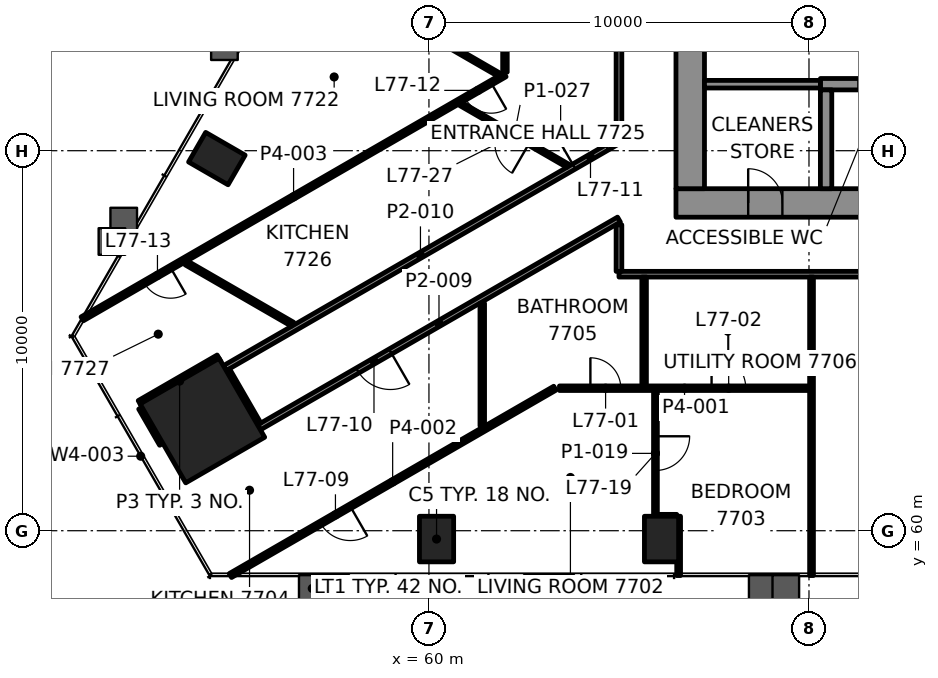
"""IFC4 building model, lengths in metres.
Left out: names, types, materials, properties, quantities, classifications, styles, units other than length and angle.
Written with IfcOpenShell. Run it as: python <this file> out.ifc"""

import sys

from ifc_helpers import new_model, si_unit, direction, frame, frame_2d, origin, origin_2d, place, context, subcontext, project, spatial, rectangle, hollow_rectangle, extrude, element, fill, save


model = new_model("IFC4")
c1 = context("Model", 3, precision=1e-05, world=origin(), true_north=direction((0.0, 1.0)))
c2 = subcontext(c1, "Body", "Model", "MODEL_VIEW")
j1 = project(units=[si_unit("LENGTHUNIT", "METRE"), si_unit("PLANEANGLEUNIT", "RADIAN")], contexts=[c1])
p1 = place(None, origin())
s1 = spatial("IfcSite", under=j1, at=p1, CompositionType="ELEMENT")
p2 = place(p1, origin())
s2 = spatial("IfcBuilding", under=s1, at=p2, CompositionType="ELEMENT")
p3 = place(p2, frame((0.0, 0.0, 316.1)))
s3 = spatial("IfcBuildingStorey", under=s2, at=p3, CompositionType="ELEMENT", Elevation=316.1)
p4 = place(p3, frame((54.039, 62.898, 0.0), z_axis=(0.0, 0.0, 1.0), x_axis=(0.5, -0.866025403784, 0.0)))
e1 = element("IfcColumn", 1, at=p4, inside=s3, PredefinedType="COLUMN", context=c2, shape_type="SweptSolid", body=[
    extrude(rectangle(XDim=2.4, YDim=2.4, at=origin_2d()), origin(), (0.0, 0.0, 1.0), 3.5),
])
for number, where, z_axis, x_axis in (
    (2, (60.2, 59.78, -0.0), (0.0, 0.0, 1.0), (1.0, 0.0, 0.0)),
    (3, (66.12, 59.78, -0.0), (0.0, 0.0, 1.0), (1.0, 0.0, 0.0)),
    (4, (54.419, 69.793, -0.0), (0.0, 0.0, 1.0), (-0.5, -0.866, 0.0)),
):
    element("IfcColumn", number, at=place(p3, frame(where, z_axis=z_axis, x_axis=x_axis)), inside=s3, PredefinedType="COLUMN", context=c2, shape_type="SweptSolid", body=[
        extrude(hollow_rectangle(XDim=0.9, YDim=1.2, WallThickness=0.06, at=origin_2d()), origin(), (0.0, 0.0, 1.0), 3.5),
    ])
p5 = place(p3, frame((66.5, 68.625, 0.0), z_axis=(0.0, 0.0, 1.0), x_axis=(1.0, 0.0, 0.0)))
e5 = element("IfcWall", 5, at=p5, inside=s3, PredefinedType="SHEAR", context=c2, shape_type="SweptSolid", body=[
    extrude(rectangle(XDim=17.0, YDim=0.75, at=frame_2d((8.5, 0.0))), origin(), (0.0, 0.0, 1.0), 3.3),
])
p6 = place(p5, frame((1.9, 0.0, 0.0)))
e6 = element("IfcOpeningElement", 6, at=p6, cuts=e5, PredefinedType="OPENING", context=c2, shape_type="SweptSolid", body=[
    extrude(rectangle(XDim=0.9, YDim=2.1, at=frame_2d((0.45, 1.05))), frame((0.0, 0.385, 0.0), z_axis=(0.0, -1.0, 0.0), x_axis=(1.0, 0.0, 0.0)), (0.0, 0.0, 1.0), 0.77),
])
p7 = place(p3, frame((66.875, 69.0, 0.0), z_axis=(0.0, 0.0, 1.0), x_axis=(0.0, 1.0, 0.0)))
e7 = element("IfcWall", 7, at=p7, inside=s3, PredefinedType="SHEAR", context=c2, shape_type="SweptSolid", body=[
    extrude(rectangle(XDim=12.0, YDim=0.75, at=frame_2d((6.0, 0.0))), origin(), (0.0, 0.0, 1.0), 3.3),
])
p8 = place(p7, frame((3.7, 0.0, 0.0)))
e8 = element("IfcOpeningElement", 8, at=p8, cuts=e7, PredefinedType="OPENING", context=c2, shape_type="SweptSolid", body=[
    extrude(rectangle(XDim=1.2, YDim=2.1, at=frame_2d((0.6, 1.05))), frame((0.0, 0.385, 0.0), z_axis=(0.0, -1.0, 0.0), x_axis=(1.0, 0.0, 0.0)), (0.0, 0.0, 1.0), 0.77),
])
p9 = place(p3, frame((70.3, 71.75, 0.0), z_axis=(0.0, 0.0, 1.0), x_axis=(1.0, 0.0, 0.0)))
e9 = element("IfcWall", 9, at=p9, inside=s3, PredefinedType="SHEAR", context=c2, shape_type="SweptSolid", body=[
    extrude(rectangle(XDim=11.5, YDim=0.3, at=frame_2d((5.75, 0.0))), origin(), (0.0, 0.0, 1.0), 3.3),
])
p10 = place(p9, frame((1.0, 0.0, 0.0)))
e10 = element("IfcOpeningElement", 10, at=p10, cuts=e9, PredefinedType="OPENING", context=c2, shape_type="SweptSolid", body=[
    extrude(rectangle(XDim=1.1, YDim=2.1, at=frame_2d((0.55, 1.05))), frame((0.0, 0.16, 0.0), z_axis=(0.0, -1.0, 0.0), x_axis=(1.0, 0.0, 0.0)), (0.0, 0.0, 1.0), 0.32),
])
p11 = place(p9, frame((3.8, 0.0, 0.0)))
e11 = element("IfcOpeningElement", 11, at=p11, cuts=e9, PredefinedType="OPENING", context=c2, shape_type="SweptSolid", body=[
    extrude(rectangle(XDim=1.1, YDim=2.1, at=frame_2d((0.55, 1.05))), frame((0.0, 0.16, 0.0), z_axis=(0.0, -1.0, 0.0), x_axis=(1.0, 0.0, 0.0)), (0.0, 0.0, 1.0), 0.32),
])
p12 = place(p9, frame((6.6, 0.0, 0.0)))
e12 = element("IfcOpeningElement", 12, at=p12, cuts=e9, PredefinedType="OPENING", context=c2, shape_type="SweptSolid", body=[
    extrude(rectangle(XDim=1.1, YDim=2.1, at=frame_2d((0.55, 1.05))), frame((0.0, 0.16, 0.0), z_axis=(0.0, -1.0, 0.0), x_axis=(1.0, 0.0, 0.0)), (0.0, 0.0, 1.0), 0.32),
])
p13 = place(p9, frame((9.4, 0.0, 0.0)))
e13 = element("IfcOpeningElement", 13, at=p13, cuts=e9, PredefinedType="OPENING", context=c2, shape_type="SweptSolid", body=[
    extrude(rectangle(XDim=1.1, YDim=2.1, at=frame_2d((0.55, 1.05))), frame((0.0, 0.16, 0.0), z_axis=(0.0, -1.0, 0.0), x_axis=(1.0, 0.0, 0.0)), (0.0, 0.0, 1.0), 0.32),
])
p14 = place(p3, frame((70.45, 69.0, 0.0), z_axis=(0.0, 0.0, 1.0), x_axis=(0.0, 1.0, 0.0)))
e14 = element("IfcWall", 14, at=p14, inside=s3, PredefinedType="SHEAR", context=c2, shape_type="SweptSolid", body=[
    extrude(rectangle(XDim=2.6, YDim=0.3, at=frame_2d((1.3, 0.0))), origin(), (0.0, 0.0, 1.0), 3.3),
])
p15 = place(p3, frame((66.02, 60.38, 0.0), z_axis=(0.0, 0.0, 1.0), x_axis=(1.0, 0.0, 0.0)))
e15 = element("IfcWall", 15, at=p15, inside=s3, PredefinedType="PARTITIONING", context=c2, shape_type="SweptSolid", body=[
    extrude(rectangle(XDim=0.5, YDim=0.1, at=frame_2d((0.25, 0.0))), origin(), (0.0, 0.0, 1.0), 2.7),
])
p16 = place(p3, frame((63.434, 63.75, 0.0), z_axis=(0.0, 0.0, 1.0), x_axis=(1.0, 0.0, 0.0)))
e16 = element("IfcWall", 16, at=p16, inside=s3, PredefinedType="PARTITIONING", context=c2, shape_type="SweptSolid", body=[
    extrude(rectangle(XDim=6.582, YDim=0.12, at=frame_2d((3.291, 0.0))), origin(), (0.0, 0.0, 1.0), 2.7),
])
p17 = place(p16, frame((0.814, 0.0, 0.0)))
e17 = element("IfcOpeningElement", 17, at=p17, cuts=e16, PredefinedType="OPENING", context=c2, shape_type="SweptSolid", body=[
    extrude(rectangle(XDim=0.8, YDim=2.1, at=frame_2d((0.4, 1.05))), frame((0.0, 0.07, 0.0), z_axis=(0.0, -1.0, 0.0), x_axis=(1.0, 0.0, 0.0)), (0.0, 0.0, 1.0), 0.14),
])
p18 = place(p16, frame((4.002, 0.0, 0.0)))
e18 = element("IfcOpeningElement", 18, at=p18, cuts=e16, PredefinedType="OPENING", context=c2, shape_type="SweptSolid", body=[
    extrude(rectangle(XDim=0.9, YDim=2.1, at=frame_2d((0.45, 1.05))), frame((0.0, 0.07, 0.0), z_axis=(0.0, -1.0, 0.0), x_axis=(1.0, 0.0, 0.0)), (0.0, 0.0, 1.0), 0.14),
])
p19 = place(p3, frame((85.0, 66.75, 0.0), z_axis=(0.0, 0.0, 1.0), x_axis=(-1.0, 0.0, 0.0)))
e19 = element("IfcWall", 19, at=p19, inside=s3, PredefinedType="PARTITIONING", context=c2, shape_type="SweptSolid", body=[
    extrude(rectangle(XDim=20.0, YDim=0.15, at=frame_2d((10.0, 0.0))), origin(), (0.0, 0.0, 1.0), 2.7),
])
p20 = place(p19, frame((2.135, 0.0, 0.0)))
e20 = element("IfcOpeningElement", 20, at=p20, cuts=e19, PredefinedType="OPENING", context=c2, shape_type="SweptSolid", body=[
    extrude(rectangle(XDim=1.0, YDim=2.1, at=frame_2d((0.5, 1.05))), frame((0.0, 0.085, 0.0), z_axis=(0.0, -1.0, 0.0), x_axis=(1.0, 0.0, 0.0)), (0.0, 0.0, 1.0), 0.17),
])
p21 = place(p19, frame((9.55, 0.0, 0.0)))
e21 = element("IfcOpeningElement", 21, at=p21, cuts=e19, PredefinedType="OPENING", context=c2, shape_type="SweptSolid", body=[
    extrude(rectangle(XDim=0.9, YDim=2.1, at=frame_2d((0.45, 1.05))), frame((0.0, 0.085, 0.0), z_axis=(0.0, -1.0, 0.0), x_axis=(1.0, 0.0, 0.0)), (0.0, 0.0, 1.0), 0.17),
])
p22 = place(p3, frame((63.314, 63.75, 0.0), z_axis=(0.0, 0.0, 1.0), x_axis=(-0.866028066272, -0.499995388408, 0.0)))
e22 = element("IfcWall", 22, at=p22, inside=s3, PredefinedType="PARTITIONING", context=c2, shape_type="SweptSolid", body=[
    extrude(rectangle(XDim=9.859, YDim=0.12, at=frame_2d((4.93, 0.0))), origin(), (0.0, 0.0, 1.0), 2.7),
])
p23 = place(p22, frame((6.218, 0.0, 0.0)))
e23 = element("IfcOpeningElement", 23, at=p23, cuts=e22, PredefinedType="OPENING", context=c2, shape_type="SweptSolid", body=[
    extrude(rectangle(XDim=0.9, YDim=2.1, at=frame_2d((0.45, 1.05))), frame((0.0, 0.07, 0.0), z_axis=(0.0, -1.0, 0.0), x_axis=(1.0, 0.0, 0.0)), (0.0, 0.0, 1.0), 0.14),
])
p24 = place(p3, frame((65.0, 68.187, 0.0), z_axis=(0.0, 0.0, 1.0), x_axis=(-0.866028339337, -0.499994915439, 0.0)))
e24 = element("IfcWall", 24, at=p24, inside=s3, PredefinedType="PARTITIONING", context=c2, shape_type="SweptSolid", body=[
    extrude(rectangle(XDim=10.937, YDim=0.15, at=frame_2d((5.468, 0.0))), origin(), (0.0, 0.0, 1.0), 2.697),
])
p25 = place(p24, frame((6.943, 0.0, 0.0)))
e25 = element("IfcOpeningElement", 25, at=p25, cuts=e24, PredefinedType="OPENING", context=c2, shape_type="SweptSolid", body=[
    extrude(rectangle(XDim=1.0, YDim=2.1, at=frame_2d((0.5, 1.05))), frame((0.0, 0.085, 0.0), z_axis=(0.0, -1.0, 0.0), x_axis=(1.0, 0.0, 0.0)), (0.0, 0.0, 1.0), 0.17),
])
p26 = place(p3, frame((54.628, 64.278, 0.0), z_axis=(0.0, 0.0, 1.0), x_axis=(0.866033426221, 0.499986104476, 0.0)))
e26 = element("IfcWall", 26, at=p26, inside=s3, PredefinedType="PARTITIONING", context=c2, shape_type="SweptSolid", body=[
    extrude(rectangle(XDim=11.89, YDim=0.15, at=frame_2d((5.945, 0.0))), origin(), (0.0, 0.0, 1.0), 2.7),
])
p27 = place(p26, frame((10.612, 0.0, 0.0)))
e27 = element("IfcOpeningElement", 27, at=p27, cuts=e26, PredefinedType="OPENING", context=c2, shape_type="SweptSolid", body=[
    extrude(rectangle(XDim=1.0, YDim=2.1, at=frame_2d((0.5, 1.05))), frame((0.0, 0.085, 0.0), z_axis=(0.0, -1.0, 0.0), x_axis=(1.0, 0.0, 0.0)), (0.0, 0.0, 1.0), 0.17),
])
p28 = place(p3, frame((52.4, 63.337, 0.0), z_axis=(0.0, 0.0, 1.0), x_axis=(0.866024647952, 0.500001309137, 0.0)))
e28 = element("IfcWall", 28, at=p28, inside=s3, PredefinedType="PARTITIONING", context=c2, shape_type="SweptSolid", body=[
    extrude(rectangle(XDim=2.4, YDim=0.2, at=frame_2d((1.2, 0.0))), origin(), (0.0, 0.0, 1.0), 2.7),
])
p29 = place(p3, frame((62.0, 71.998, 0.0), z_axis=(0.0, 0.0, 1.0), x_axis=(-0.866023842607, -0.500002704028, 0.0)))
e29 = element("IfcWall", 29, at=p29, inside=s3, PredefinedType="PARTITIONING", context=c2, shape_type="SweptSolid", body=[
    extrude(rectangle(XDim=12.845, YDim=0.12, at=frame_2d((6.422, 0.0))), origin(), (0.0, 0.0, 1.0), 2.7),
])
p30 = place(p29, frame((0.421, 0.0, 0.0)))
e30 = element("IfcOpeningElement", 30, at=p30, cuts=e29, PredefinedType="OPENING", context=c2, shape_type="SweptSolid", body=[
    extrude(rectangle(XDim=0.8, YDim=2.1, at=frame_2d((0.4, 1.05))), frame((0.0, 0.07, 0.0), z_axis=(0.0, -1.0, 0.0), x_axis=(1.0, 0.0, 0.0)), (0.0, 0.0, 1.0), 0.14),
])
p31 = place(p29, frame((10.158, 0.0, 0.0)))
e31 = element("IfcOpeningElement", 31, at=p31, cuts=e29, PredefinedType="OPENING", context=c2, shape_type="SweptSolid", body=[
    extrude(rectangle(XDim=0.8, YDim=2.1, at=frame_2d((0.4, 1.05))), frame((0.0, 0.07, 0.0), z_axis=(0.0, -1.0, 0.0), x_axis=(1.0, 0.0, 0.0)), (0.0, 0.0, 1.0), 0.14),
])
p32 = place(p3, frame((70.067, 58.82, 0.0), z_axis=(0.0, 0.0, 1.0), x_axis=(0.0, 1.0, 0.0)))
e32 = element("IfcWall", 32, at=p32, inside=s3, PredefinedType="PARTITIONING", context=c2, shape_type="SweptSolid", body=[
    extrude(rectangle(XDim=7.855, YDim=0.1, at=frame_2d((3.927, 0.0))), origin(), (0.0, 0.0, 1.0), 2.688),
])
p33 = place(p3, frame((66.57, 58.82, 0.0), z_axis=(0.0, 0.0, 1.0), x_axis=(0.0, 1.0, 0.0)))
e33 = element("IfcWall", 33, at=p33, inside=s3, PredefinedType="PARTITIONING", context=c2, shape_type="SweptSolid", body=[
    extrude(rectangle(XDim=1.56, YDim=0.1, at=frame_2d((0.78, 0.0))), origin(), (0.0, 0.0, 1.0), 2.688),
])
p34 = place(p3, frame((65.96, 63.69, 0.0), z_axis=(0.0, 0.0, 1.0), x_axis=(0.0, -1.0, 0.0)))
e34 = element("IfcWall", 34, at=p34, inside=s3, PredefinedType="PARTITIONING", context=c2, shape_type="SweptSolid", body=[
    extrude(rectangle(XDim=3.31, YDim=0.1, at=frame_2d((1.655, 0.0))), origin(), (0.0, 0.0, 1.0), 2.7),
])
p35 = place(p34, frame((1.205, 0.0, 0.0)))
e35 = element("IfcOpeningElement", 35, at=p35, cuts=e34, PredefinedType="OPENING", context=c2, shape_type="SweptSolid", body=[
    extrude(rectangle(XDim=0.9, YDim=2.1, at=frame_2d((0.45, 1.05))), frame((0.0, 0.06, 0.0), z_axis=(0.0, -1.0, 0.0), x_axis=(1.0, 0.0, 0.0)), (0.0, 0.0, 1.0), 0.12),
])
p36 = place(p3, frame((65.662, 63.81, 0.0), z_axis=(0.0, 0.0, 1.0), x_axis=(0.0, 1.0, 0.0)))
e36 = element("IfcWall", 36, at=p36, inside=s3, PredefinedType="PARTITIONING", context=c2, shape_type="SweptSolid", body=[
    extrude(rectangle(XDim=2.865, YDim=0.12, at=frame_2d((1.433, 0.0))), origin(), (0.0, 0.0, 1.0), 2.7),
])
p37 = place(p3, frame((65.0, 66.825, 0.0), z_axis=(0.0, 0.0, 1.0), x_axis=(0.0, 1.0, 0.0)))
e37 = element("IfcWall", 37, at=p37, inside=s3, PredefinedType="PARTITIONING", context=c2, shape_type="SweptSolid", body=[
    extrude(rectangle(XDim=1.226, YDim=0.15, at=frame_2d((0.613, 0.0))), origin(), (0.0, 0.0, 1.0), 2.697),
])
p38 = place(p3, frame((65.0, 70.266, 0.0), z_axis=(0.0, 0.0, 1.0), x_axis=(0.0, 1.0, 0.0)))
e38 = element("IfcWall", 38, at=p38, inside=s3, PredefinedType="PARTITIONING", context=c2, shape_type="SweptSolid", body=[
    extrude(rectangle(XDim=12.984, YDim=0.15, at=frame_2d((6.492, 0.0))), origin(), (0.0, 0.0, 1.0), 2.7),
])
p39 = place(p3, frame((62.0, 81.366, 0.0), z_axis=(0.0, 0.0, 1.0), x_axis=(0.0, -1.0, 0.0)))
e39 = element("IfcWall", 39, at=p39, inside=s3, PredefinedType="PARTITIONING", context=c2, shape_type="SweptSolid", body=[
    extrude(rectangle(XDim=9.299, YDim=0.12, at=frame_2d((4.649, 0.0))), origin(), (0.0, 0.0, 1.0), 2.7),
])
p40 = place(p39, frame((2.033, 0.0, 0.0)))
e40 = element("IfcOpeningElement", 40, at=p40, cuts=e39, PredefinedType="OPENING", context=c2, shape_type="SweptSolid", body=[
    extrude(rectangle(XDim=0.8, YDim=2.1, at=frame_2d((0.4, 1.05))), frame((0.0, 0.07, 0.0), z_axis=(0.0, -1.0, 0.0), x_axis=(1.0, 0.0, 0.0)), (0.0, 0.0, 1.0), 0.14),
])
p41 = place(p39, frame((6.8, 0.0, 0.0)))
e41 = element("IfcOpeningElement", 41, at=p41, cuts=e39, PredefinedType="OPENING", context=c2, shape_type="SweptSolid", body=[
    extrude(rectangle(XDim=0.9, YDim=2.1, at=frame_2d((0.45, 1.05))), frame((0.0, 0.07, 0.0), z_axis=(0.0, -1.0, 0.0), x_axis=(1.0, 0.0, 0.0)), (0.0, 0.0, 1.0), 0.14),
])
p42 = place(p3, frame((61.403, 62.756, 0.0), z_axis=(0.0, 0.0, 1.0), x_axis=(0.0, 1.0, 0.0)))
e42 = element("IfcWall", 42, at=p42, inside=s3, PredefinedType="PARTITIONING", context=c2, shape_type="SweptSolid", body=[
    extrude(rectangle(XDim=3.228, YDim=0.12, at=frame_2d((1.614, 0.0))), origin(), (0.0, 0.0, 1.0), 2.697),
])
p43 = place(p3, frame((55.49, 62.784, 0.0), z_axis=(0.0, 0.0, 1.0), x_axis=(-0.499970888758, 0.866042210515, 0.0)))
e43 = element("IfcWall", 43, at=p43, inside=s3, PredefinedType="PARTITIONING", context=c2, shape_type="SweptSolid", body=[
    extrude(rectangle(XDim=1.645, YDim=0.2, at=frame_2d((0.822, 0.0))), origin(), (0.0, 0.0, 1.0), 2.697),
])
p44 = place(p3, frame((53.0, 62.298, 0.0), z_axis=(0.0, 0.0, 1.0), x_axis=(-0.50002983664, 0.866008176907, 0.0)))
e44 = element("IfcWall", 44, at=p44, inside=s3, PredefinedType="PARTITIONING", context=c2, shape_type="SweptSolid", body=[
    extrude(rectangle(XDim=1.1, YDim=0.2, at=frame_2d((0.55, 0.0))), origin(), (0.0, 0.0, 1.0), 2.7),
])
p45 = place(p3, frame((61.837, 72.003, 0.0), z_axis=(0.0, 0.0, 1.0), x_axis=(-0.86602790099, 0.499995674689, 0.0)))
e45 = element("IfcWall", 45, at=p45, inside=s3, PredefinedType="PARTITIONING", context=c2, shape_type="SweptSolid", body=[
    extrude(rectangle(XDim=4.718, YDim=0.1, at=frame_2d((2.359, 0.0))), origin(), (0.0, 0.0, 1.0), 2.7),
])
p46 = place(p3, frame((63.652, 69.604, 0.0), z_axis=(0.0, 0.0, 1.0), x_axis=(-0.866032882975, 0.499987045439, 0.0)))
e46 = element("IfcWall", 46, at=p46, inside=s3, PredefinedType="PARTITIONING", context=c2, shape_type="SweptSolid", body=[
    extrude(rectangle(XDim=3.248, YDim=0.1, at=frame_2d((1.624, 0.0))), origin(), (0.0, 0.0, 1.0), 2.7),
])
p47 = place(p46, frame((1.174, 0.0, 0.0)))
e47 = element("IfcOpeningElement", 47, at=p47, cuts=e46, PredefinedType="OPENING", context=c2, shape_type="SweptSolid", body=[
    extrude(rectangle(XDim=0.9, YDim=2.1, at=frame_2d((0.45, 1.05))), frame((0.0, 0.06, 0.0), z_axis=(0.0, -1.0, 0.0), x_axis=(1.0, 0.0, 0.0)), (0.0, 0.0, 1.0), 0.12),
])
p48 = place(p3, frame((56.41, 65.433, 0.0), z_axis=(0.0, 0.0, 1.0), x_axis=(-0.866000447062, 0.500043223821, 0.0)))
e48 = element("IfcWall", 48, at=p48, inside=s3, PredefinedType="PARTITIONING", context=c2, shape_type="SweptSolid", body=[
    extrude(rectangle(XDim=3.228, YDim=0.12, at=frame_2d((1.614, 0.0))), origin(), (0.0, 0.0, 1.0), 2.7),
])
p49 = place(p3, frame((67.25, 71.75, 0.0), z_axis=(0.0, 0.0, 1.0), x_axis=(1.0, 0.0, 0.0)))
e49 = element("IfcWall", 49, at=p49, inside=s3, PredefinedType="PARTITIONING", context=c2, shape_type="SweptSolid", body=[
    extrude(rectangle(XDim=3.05, YDim=0.2, at=frame_2d((1.525, 0.0))), origin(), (0.0, 0.0, 1.0), 3.3),
])
p50 = place(p17, origin())
e50 = element("IfcDoor", 50, at=p50, inside=s3, OperationType="SINGLE_SWING_RIGHT", PredefinedType="DOOR", context=c2, shape_type="SweptSolid", body=[
    extrude(rectangle(XDim=0.8, YDim=2.1, at=frame_2d((0.4, 1.05))), frame((0.0, 0.025, 0.0), z_axis=(0.0, -1.0, 0.0), x_axis=(1.0, 0.0, 0.0)), (0.0, 0.0, 1.0), 0.05),
])
fill(e17, e50)
p51 = place(p18, origin())
e51 = element("IfcDoor", 51, at=p51, inside=s3, OperationType="SINGLE_SWING_LEFT", PredefinedType="DOOR", context=c2, shape_type="SweptSolid", body=[
    extrude(rectangle(XDim=0.9, YDim=2.1, at=frame_2d((0.45, 1.05))), frame((0.0, 0.025, 0.0), z_axis=(0.0, -1.0, 0.0), x_axis=(1.0, 0.0, 0.0)), (0.0, 0.0, 1.0), 0.05),
])
fill(e18, e51)
p52 = place(p23, origin())
e52 = element("IfcDoor", 52, at=p52, inside=s3, OperationType="SINGLE_SWING_RIGHT", PredefinedType="DOOR", context=c2, shape_type="SweptSolid", body=[
    extrude(rectangle(XDim=0.9, YDim=2.1, at=frame_2d((0.45, 1.05))), frame((0.0, 0.025, 0.0), z_axis=(0.0, -1.0, 0.0), x_axis=(1.0, 0.0, 0.0)), (0.0, 0.0, 1.0), 0.05),
])
fill(e23, e52)
p53 = place(p25, origin())
e53 = element("IfcDoor", 53, at=p53, inside=s3, OperationType="SINGLE_SWING_LEFT", PredefinedType="DOOR", context=c2, shape_type="SweptSolid", body=[
    extrude(rectangle(XDim=1.0, YDim=2.1, at=frame_2d((0.5, 1.05))), frame((0.0, 0.025, 0.0), z_axis=(0.0, -1.0, 0.0), x_axis=(1.0, 0.0, 0.0)), (0.0, 0.0, 1.0), 0.05),
])
fill(e25, e53)
p54 = place(p27, origin())
e54 = element("IfcDoor", 54, at=p54, inside=s3, OperationType="SINGLE_SWING_RIGHT", PredefinedType="DOOR", context=c2, shape_type="SweptSolid", body=[
    extrude(rectangle(XDim=1.0, YDim=2.1, at=frame_2d((0.5, 1.05))), frame((0.0, 0.025, 0.0), z_axis=(0.0, -1.0, 0.0), x_axis=(1.0, 0.0, 0.0)), (0.0, 0.0, 1.0), 0.05),
])
fill(e27, e54)
p55 = place(p30, origin())
e55 = element("IfcDoor", 55, at=p55, inside=s3, OperationType="SINGLE_SWING_RIGHT", PredefinedType="DOOR", context=c2, shape_type="SweptSolid", body=[
    extrude(rectangle(XDim=0.8, YDim=2.1, at=frame_2d((0.4, 1.05))), frame((0.0, 0.025, 0.0), z_axis=(0.0, -1.0, 0.0), x_axis=(1.0, 0.0, 0.0)), (0.0, 0.0, 1.0), 0.05),
])
fill(e30, e55)
p56 = place(p31, origin())
e56 = element("IfcDoor", 56, at=p56, inside=s3, OperationType="SINGLE_SWING_RIGHT", PredefinedType="DOOR", context=c2, shape_type="SweptSolid", body=[
    extrude(rectangle(XDim=0.8, YDim=2.1, at=frame_2d((0.4, 1.05))), frame((0.0, 0.025, 0.0), z_axis=(0.0, -1.0, 0.0), x_axis=(1.0, 0.0, 0.0)), (0.0, 0.0, 1.0), 0.05),
])
fill(e31, e56)
p57 = place(p35, origin())
e57 = element("IfcDoor", 57, at=p57, inside=s3, OperationType="SINGLE_SWING_RIGHT", PredefinedType="DOOR", context=c2, shape_type="SweptSolid", body=[
    extrude(rectangle(XDim=0.9, YDim=2.1, at=frame_2d((0.45, 1.05))), frame((0.0, 0.025, 0.0), z_axis=(0.0, -1.0, 0.0), x_axis=(1.0, 0.0, 0.0)), (0.0, 0.0, 1.0), 0.05),
])
fill(e35, e57)
p58 = place(p47, origin())
e58 = element("IfcDoor", 58, at=p58, inside=s3, OperationType="SINGLE_SWING_RIGHT", PredefinedType="DOOR", context=c2, shape_type="SweptSolid", body=[
    extrude(rectangle(XDim=0.9, YDim=2.1, at=frame_2d((0.45, 1.05))), frame((0.0, 0.025, 0.0), z_axis=(0.0, -1.0, 0.0), x_axis=(1.0, 0.0, 0.0)), (0.0, 0.0, 1.0), 0.05),
])
fill(e47, e58)
p59 = place(p6, origin())
e59 = element("IfcDoor", 59, at=p59, inside=s3, OperationType="SINGLE_SWING_RIGHT", PredefinedType="DOOR", context=c2, shape_type="SweptSolid", body=[
    extrude(rectangle(XDim=0.9, YDim=2.1, at=frame_2d((0.45, 1.05))), frame((0.0, 0.095, 0.0), z_axis=(0.0, -1.0, 0.0), x_axis=(1.0, 0.0, 0.0)), (0.0, 0.0, 1.0), 0.19),
])
fill(e6, e59)
save(model, sys.argv[1])
